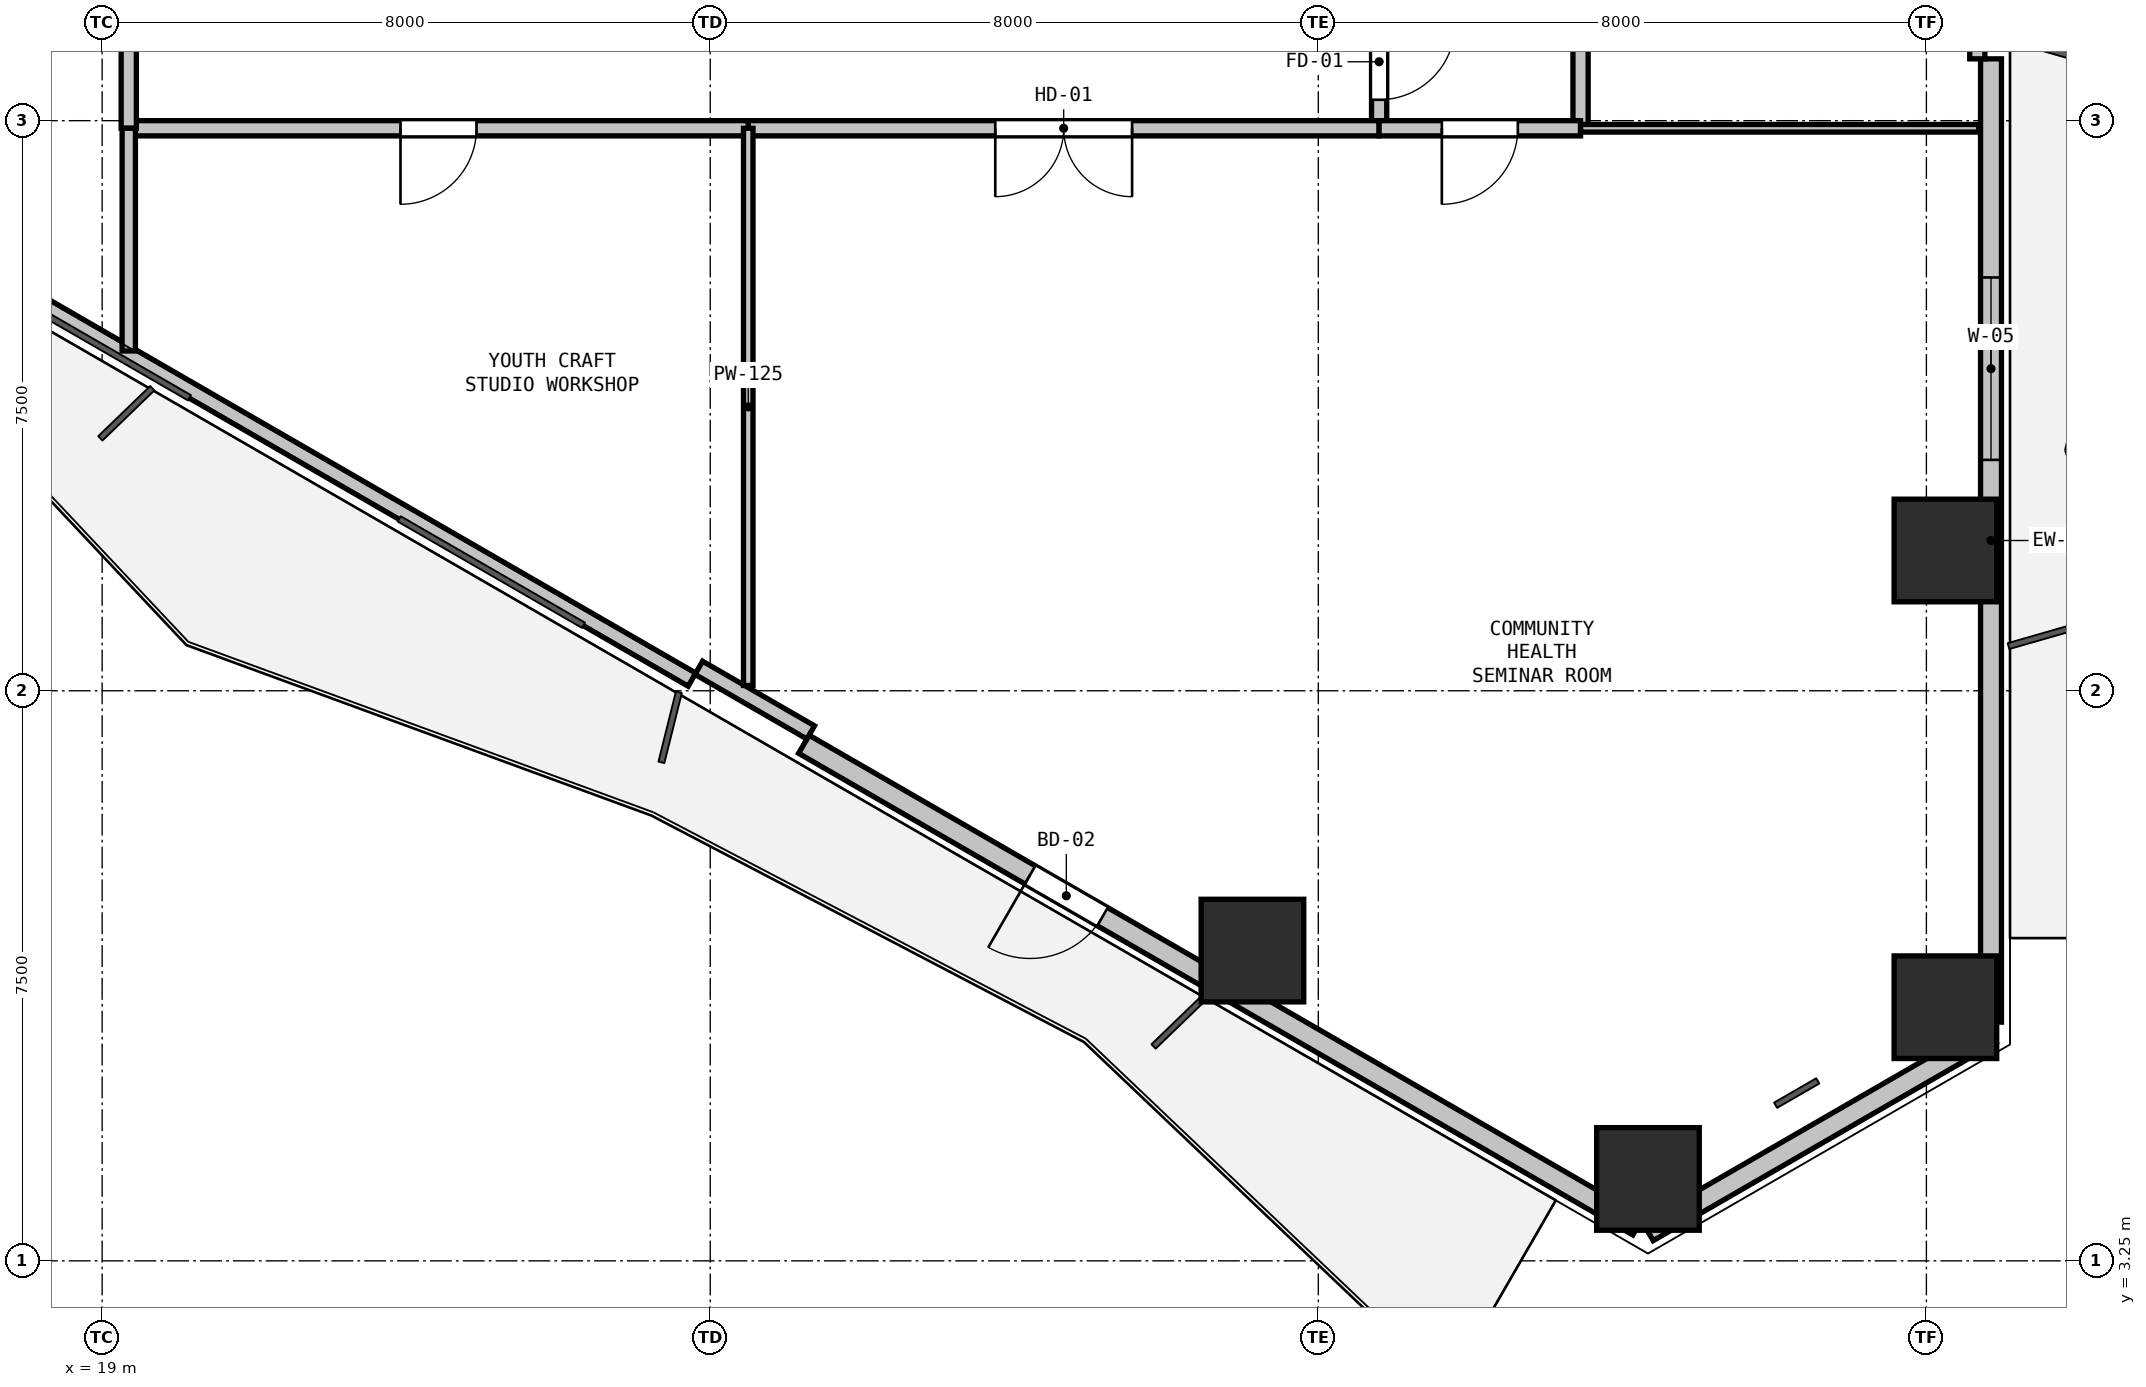
"""IFC4 building model, lengths in metres.
Left out: names, types, materials, properties, quantities, classifications, styles, units other than length and angle.
Written with IfcOpenShell. Run it as: python <this file> out.ifc"""

import sys

from ifc_helpers import new_model, si_unit, direction, frame, frame_2d, origin, origin_2d, place, context, subcontext, project, spatial, rectangle, hollow_rectangle, extrude, element, fill, save


model = new_model("IFC4")
c1 = context("Model", 3, precision=1e-05, world=origin(), true_north=direction((0.0, 1.0)))
c2 = subcontext(c1, "Body", "Model", "MODEL_VIEW")
j1 = project(units=[si_unit("LENGTHUNIT", "METRE"), si_unit("PLANEANGLEUNIT", "RADIAN")], contexts=[c1])
p1 = place(None, origin())
s1 = spatial("IfcSite", under=j1, at=p1, CompositionType="ELEMENT")
p2 = place(p1, origin())
s2 = spatial("IfcBuilding", under=s1, at=p2, CompositionType="ELEMENT")
p3 = place(p2, frame((0.0, 0.0, 19.2)))
s3 = spatial("IfcBuildingStorey", under=s2, at=p3, CompositionType="ELEMENT", Elevation=19.2)
for number, where, z_axis, x_axis in (
    (1, (43.25, 12.595, 0.0), (0.0, 0.0, 1.0), (1.0, 0.0, 0.0)),
    (2, (43.25, 6.587, 0.0), (0.0, 0.0, 1.0), (1.0, 0.0, 0.0)),
    (3, (39.337, 4.327, 0.0), (0.0, 0.0, 1.0), (1.0, 0.0, 0.0)),
    (4, (34.133, 7.332, 0.0), (0.0, 0.0, 1.0), (1.0, 0.0, 0.0)),
):
    element("IfcColumn", number, at=place(p3, frame(where, z_axis=z_axis, x_axis=x_axis)), inside=s3, PredefinedType="COLUMN", context=c2, shape_type="SweptSolid", body=[
        extrude(hollow_rectangle(XDim=1.35, YDim=1.35, WallThickness=0.036, at=origin_2d()), origin(), (0.0, 0.0, 1.0), 3.3),
    ])
p4 = place(p3, frame((43.85, 6.24, 0.0), z_axis=(0.0, 0.0, 1.0), x_axis=(-0.866043601342, -0.499968479581, 0.0)))
e5 = element("IfcWall", 5, at=p4, inside=s3, PredefinedType="SOLIDWALL", context=c2, shape_type="SweptSolid", body=[
    extrude(rectangle(XDim=5.211, YDim=0.275, at=frame_2d((2.605, 0.0))), origin(), (0.0, 0.0, 1.0), 2.66),
])
p5 = place(p3, frame((43.85, 19.063, 0.0), z_axis=(0.0, 0.0, 1.0), x_axis=(0.0, -1.0, 0.0)))
e6 = element("IfcWall", 6, at=p5, inside=s3, PredefinedType="SOLIDWALL", context=c2, shape_type="SweptSolid", body=[
    extrude(rectangle(XDim=12.673, YDim=0.275, at=frame_2d((6.336, 0.0))), origin(), (0.0, 0.0, 1.0), 2.66),
])
p6 = place(p5, frame((2.876, 0.0, 0.9)))
e7 = element("IfcOpeningElement", 7, at=p6, cuts=e6, PredefinedType="OPENING", context=c2, shape_type="SweptSolid", body=[
    extrude(rectangle(XDim=2.4, YDim=1.6, at=frame_2d((1.2, 0.8))), frame((0.0, 0.147, 0.0), z_axis=(0.0, -1.0, 0.0), x_axis=(1.0, 0.0, 0.0)), (0.0, 0.0, 1.0), 0.295),
])
p7 = place(p3, frame((43.67, 20.763, 0.0), z_axis=(0.0, 0.0, 1.0), x_axis=(0.0, -1.0, 0.0)))
e8 = element("IfcWall", 8, at=p7, inside=s3, PredefinedType="PARAPET", context=c2, shape_type="SweptSolid", body=[
    extrude(rectangle(XDim=1.7, YDim=0.2, at=frame_2d((0.85, 0.0))), origin(), (0.0, 0.0, 1.0), 2.66),
])
p8 = place(p3, frame((39.207, 3.71, 0.0), z_axis=(0.0, 0.0, 1.0), x_axis=(-0.86603192154, 0.499988710747, 0.0)))
e9 = element("IfcWall", 9, at=p8, inside=s3, PredefinedType="SOLIDWALL", context=c2, shape_type="SweptSolid", body=[
    extrude(rectangle(XDim=12.673, YDim=0.275, at=frame_2d((6.336, 0.0))), origin(), (0.0, 0.0, 1.0), 2.66),
])
p9 = place(p8, frame((8.136, 0.0, 0.0)))
e10 = element("IfcOpeningElement", 10, at=p9, cuts=e9, PredefinedType="OPENING", context=c2, shape_type="SweptSolid", body=[
    extrude(rectangle(XDim=1.1, YDim=2.1, at=frame_2d((0.55, 1.05))), frame((0.0, 0.147, 0.0), z_axis=(0.0, -1.0, 0.0), x_axis=(1.0, 0.0, 0.0)), (0.0, 0.0, 1.0), 0.295),
])
p10 = place(p3, frame((26.76, 10.896, 0.0), z_axis=(0.0, 0.0, 1.0), x_axis=(-0.866027351828, 0.499996625875, 0.0)))
e11 = element("IfcWall", 11, at=p10, inside=s3, PredefinedType="PARAPET", context=c2, shape_type="SweptSolid", body=[
    extrude(rectangle(XDim=11.973, YDim=0.2, at=frame_2d((5.987, 0.0))), origin(), (0.0, 0.0, 1.0), 0.2),
])
p11 = place(p3, frame((28.322, 10.202, 0.0), z_axis=(0.0, 0.0, 1.0), x_axis=(-0.86605165483, 0.499954529098, 0.0)))
e12 = element("IfcWall", 12, at=p11, inside=s3, PredefinedType="PARAPET", context=c2, shape_type="SweptSolid", body=[
    extrude(rectangle(XDim=1.7, YDim=0.2, at=frame_2d((0.85, 0.0))), origin(), (0.0, 0.0, 1.0), 2.66),
])
p12 = place(p3, frame((35.8, 19.9, 0.0), z_axis=(0.0, 0.0, 1.0), x_axis=(0.0, -1.0, 0.0)))
e13 = element("IfcWall", 13, at=p12, inside=s3, PredefinedType="PARTITIONING", context=c2, shape_type="SweptSolid", body=[
    extrude(rectangle(XDim=1.75, YDim=0.2, at=frame_2d((0.875, 0.0))), origin(), (0.0, 0.0, 1.0), 3.04),
])
p13 = place(p12, frame((0.375, 0.0, 0.0)))
e14 = element("IfcOpeningElement", 14, at=p13, cuts=e13, PredefinedType="OPENING", context=c2, shape_type="SweptSolid", body=[
    extrude(rectangle(XDim=1.0, YDim=2.15, at=frame_2d((0.5, 1.075))), frame((0.0, 0.11, 0.0), z_axis=(0.0, -1.0, 0.0), x_axis=(1.0, 0.0, 0.0)), (0.0, 0.0, 1.0), 0.22),
])
p14 = place(p3, frame((35.8, 18.15, 0.0), z_axis=(0.0, 0.0, 1.0), x_axis=(-1.0, 0.0, 0.0)))
e15 = element("IfcWall", 15, at=p14, inside=s3, PredefinedType="PARTITIONING", context=c2, shape_type="SweptSolid", body=[
    extrude(rectangle(XDim=8.3, YDim=0.2, at=frame_2d((4.15, 0.0))), origin(), (0.0, 0.0, 1.0), 3.04),
])
p15 = place(p14, frame((3.25, 0.0, 0.0)))
e16 = element("IfcOpeningElement", 16, at=p15, cuts=e15, PredefinedType="OPENING", context=c2, shape_type="SweptSolid", body=[
    extrude(rectangle(XDim=1.8, YDim=2.2, at=frame_2d((0.9, 1.1))), frame((0.0, 0.11, 0.0), z_axis=(0.0, -1.0, 0.0), x_axis=(1.0, 0.0, 0.0)), (0.0, 0.0, 1.0), 0.22),
])
p16 = place(p3, frame((27.5, 18.15, 0.0), z_axis=(0.0, 0.0, 1.0), x_axis=(-1.0, 0.0, 0.0)))
e17 = element("IfcWall", 17, at=p16, inside=s3, PredefinedType="PARTITIONING", context=c2, shape_type="SweptSolid", body=[
    extrude(rectangle(XDim=8.15, YDim=0.2, at=frame_2d((4.075, 0.0))), origin(), (0.0, 0.0, 1.0), 2.338),
])
p17 = place(p16, frame((3.575, 0.0, 0.0)))
e18 = element("IfcOpeningElement", 18, at=p17, cuts=e17, PredefinedType="OPENING", context=c2, shape_type="SweptSolid", body=[
    extrude(rectangle(XDim=1.0, YDim=2.15, at=frame_2d((0.5, 1.075))), frame((0.0, 0.11, 0.0), z_axis=(0.0, -1.0, 0.0), x_axis=(1.0, 0.0, 0.0)), (0.0, 0.0, 1.0), 0.22),
])
p18 = place(p3, frame((19.35, 18.15, 0.0), z_axis=(0.0, 0.0, 1.0), x_axis=(0.0, 1.0, 0.0)))
e19 = element("IfcWall", 19, at=p18, inside=s3, PredefinedType="PARTITIONING", context=c2, shape_type="SweptSolid", body=[
    extrude(rectangle(XDim=4.05, YDim=0.2, at=frame_2d((2.025, 0.0))), origin(), (0.0, 0.0, 1.0), 2.338),
])
p19 = place(p18, frame((1.6, 0.0, 0.0)))
e20 = element("IfcOpeningElement", 20, at=p19, cuts=e19, PredefinedType="OPENING", context=c2, shape_type="SweptSolid", body=[
    extrude(rectangle(XDim=0.85, YDim=2.1, at=frame_2d((0.425, 1.05))), frame((0.0, 0.11, 0.0), z_axis=(0.0, -1.0, 0.0), x_axis=(1.0, 0.0, 0.0)), (0.0, 0.0, 1.0), 0.22),
])
p20 = place(p3, frame((38.45, 35.35, 0.0), z_axis=(0.0, 0.0, 1.0), x_axis=(0.0, -1.0, 0.0)))
e21 = element("IfcWall", 21, at=p20, inside=s3, PredefinedType="PARTITIONING", context=c2, shape_type="SweptSolid", body=[
    extrude(rectangle(XDim=17.2, YDim=0.2, at=frame_2d((8.6, 0.0))), origin(), (0.0, 0.0, 1.0), 3.04),
])
p21 = place(p20, frame((7.7, 0.0, 0.0)))
e22 = element("IfcOpeningElement", 22, at=p21, cuts=e21, PredefinedType="OPENING", context=c2, shape_type="SweptSolid", body=[
    extrude(rectangle(XDim=1.8, YDim=2.2, at=frame_2d((0.9, 1.1))), frame((0.0, 0.11, 0.0), z_axis=(0.0, -1.0, 0.0), x_axis=(1.0, 0.0, 0.0)), (0.0, 0.0, 1.0), 0.22),
])
p22 = place(p3, frame((38.45, 18.15, 0.0), z_axis=(0.0, 0.0, 1.0), x_axis=(-1.0, 0.0, 0.0)))
e23 = element("IfcWall", 23, at=p22, inside=s3, PredefinedType="PARTITIONING", context=c2, shape_type="SweptSolid", body=[
    extrude(rectangle(XDim=2.65, YDim=0.2, at=frame_2d((1.325, 0.0))), origin(), (0.0, 0.0, 1.0), 2.338),
])
p23 = place(p22, frame((0.825, 0.0, 0.0)))
e24 = element("IfcOpeningElement", 24, at=p23, cuts=e23, PredefinedType="OPENING", context=c2, shape_type="SweptSolid", body=[
    extrude(rectangle(XDim=1.0, YDim=2.15, at=frame_2d((0.5, 1.075))), frame((0.0, 0.11, 0.0), z_axis=(0.0, -1.0, 0.0), x_axis=(1.0, 0.0, 0.0)), (0.0, 0.0, 1.0), 0.22),
])
p24 = place(p3, frame((19.35, 18.15, 0.0), z_axis=(0.0, 0.0, 1.0), x_axis=(0.0, -1.0, 0.0)))
e25 = element("IfcWall", 25, at=p24, inside=s3, PredefinedType="PLUMBINGWALL", context=c2, shape_type="SweptSolid", body=[
    extrude(rectangle(XDim=2.93, YDim=0.175, at=frame_2d((1.465, 0.0))), origin(), (0.0, 0.0, 1.0), 2.365),
])
p25 = place(p3, frame((43.688, 18.15, 0.0), z_axis=(0.0, 0.0, 1.0), x_axis=(-1.0, 0.0, 0.0)))
e26 = element("IfcWall", 26, at=p25, inside=s3, PredefinedType="PARTITIONING", context=c2, shape_type="SweptSolid", body=[
    extrude(rectangle(XDim=5.239, YDim=0.1, at=frame_2d((2.619, 0.0))), origin(), (0.0, 0.0, 1.0), 2.365),
])
p26 = place(p3, frame((27.5, 10.82, 0.0), z_axis=(0.0, 0.0, 1.0), x_axis=(0.0, 1.0, 0.0)))
e27 = element("IfcWall", 27, at=p26, inside=s3, PredefinedType="PARTITIONING", context=c2, shape_type="SweptSolid", body=[
    extrude(rectangle(XDim=7.33, YDim=0.125, at=frame_2d((3.665, 0.0))), origin(), (0.0, 0.0, 1.0), 2.338),
])
p27 = place(p6, origin())
e28 = element("IfcWindow", 28, at=p27, inside=s3, PartitioningType="SINGLE_PANEL", PredefinedType="WINDOW", context=c2, shape_type="SweptSolid", body=[
    extrude(rectangle(XDim=2.4, YDim=1.6, at=frame_2d((1.2, 0.8))), frame((0.0, 0.03, 0.0), z_axis=(0.0, -1.0, 0.0), x_axis=(1.0, 0.0, 0.0)), (0.0, 0.0, 1.0), 0.06),
])
fill(e7, e28)
p28 = place(p9, origin())
e29 = element("IfcDoor", 29, at=p28, inside=s3, OperationType="SINGLE_SWING_RIGHT", PredefinedType="DOOR", context=c2, shape_type="SweptSolid", body=[
    extrude(rectangle(XDim=1.1, YDim=2.1, at=frame_2d((0.55, 1.05))), frame((0.0, 0.025, 0.0), z_axis=(0.0, -1.0, 0.0), x_axis=(1.0, 0.0, 0.0)), (0.0, 0.0, 1.0), 0.05),
])
fill(e10, e29)
p29 = place(p13, origin())
e30 = element("IfcDoor", 30, at=p29, inside=s3, OperationType="SINGLE_SWING_LEFT", PredefinedType="DOOR", context=c2, shape_type="SweptSolid", body=[
    extrude(rectangle(XDim=1.0, YDim=2.15, at=frame_2d((0.5, 1.075))), frame((0.0, 0.025, 0.0), z_axis=(0.0, -1.0, 0.0), x_axis=(1.0, 0.0, 0.0)), (0.0, 0.0, 1.0), 0.05),
])
fill(e14, e30)
p30 = place(p15, origin())
e31 = element("IfcDoor", 31, at=p30, inside=s3, OperationType="DOUBLE_DOOR_SINGLE_SWING", PredefinedType="DOOR", context=c2, shape_type="SweptSolid", body=[
    extrude(rectangle(XDim=1.8, YDim=2.2, at=frame_2d((0.9, 1.1))), frame((0.0, 0.025, 0.0), z_axis=(0.0, -1.0, 0.0), x_axis=(1.0, 0.0, 0.0)), (0.0, 0.0, 1.0), 0.05),
])
fill(e16, e31)
p31 = place(p17, origin())
e32 = element("IfcDoor", 32, at=p31, inside=s3, OperationType="SINGLE_SWING_RIGHT", PredefinedType="DOOR", context=c2, shape_type="SweptSolid", body=[
    extrude(rectangle(XDim=1.0, YDim=2.15, at=frame_2d((0.5, 1.075))), frame((0.0, 0.025, 0.0), z_axis=(0.0, -1.0, 0.0), x_axis=(1.0, 0.0, 0.0)), (0.0, 0.0, 1.0), 0.05),
])
fill(e18, e32)
p32 = place(p23, origin())
e33 = element("IfcDoor", 33, at=p32, inside=s3, OperationType="SINGLE_SWING_RIGHT", PredefinedType="DOOR", context=c2, shape_type="SweptSolid", body=[
    extrude(rectangle(XDim=1.0, YDim=2.15, at=frame_2d((0.5, 1.075))), frame((0.0, 0.025, 0.0), z_axis=(0.0, -1.0, 0.0), x_axis=(1.0, 0.0, 0.0)), (0.0, 0.0, 1.0), 0.05),
])
fill(e24, e33)
save(model, sys.argv[1])
